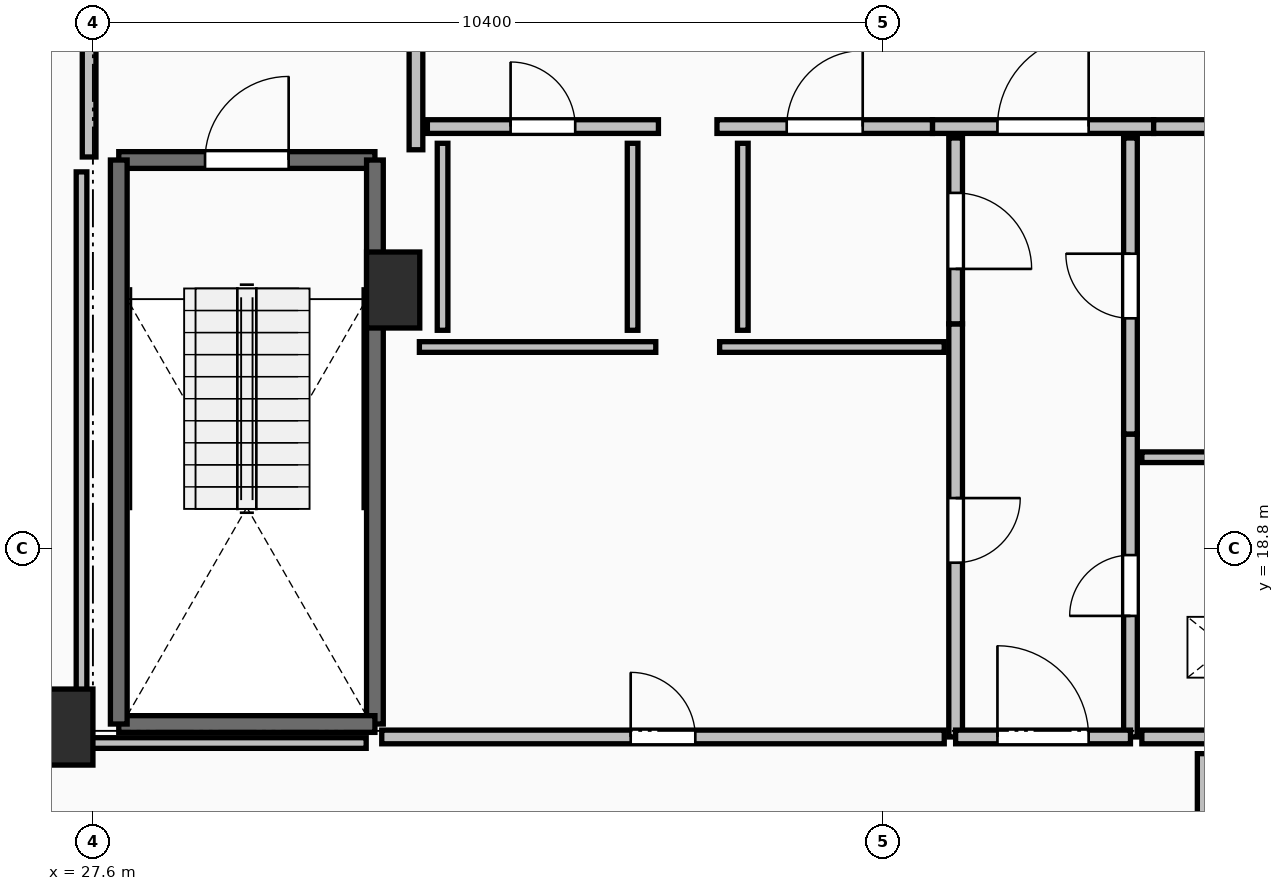
"""IFC4 building model, lengths in metres.
Left out: names, types, materials, properties, quantities, classifications, styles, units other than length and angle.
Written with IfcOpenShell. Run it as: python <this file> out.ifc"""

import sys

from ifc_helpers import new_model, si_unit, direction, frame, frame_2d, origin, origin_2d, place, context, subcontext, project, spatial, rectangle, extrude, element, fill, save


model = new_model("IFC4")
c1 = context("Model", 3, precision=1e-05, world=origin(), true_north=direction((0.0, 1.0)))
c2 = subcontext(c1, "Body", "Model", "MODEL_VIEW")
j1 = project(units=[si_unit("LENGTHUNIT", "METRE"), si_unit("PLANEANGLEUNIT", "RADIAN")], contexts=[c1])
p1 = place(None, origin())
s1 = spatial("IfcSite", under=j1, at=p1, CompositionType="ELEMENT")
p2 = place(p1, origin())
s2 = spatial("IfcBuilding", under=s1, at=p2, CompositionType="ELEMENT")
p3 = place(p2, frame((0.0, 0.0, 266.2)))
s3 = spatial("IfcBuildingStorey", under=s2, at=p3, CompositionType="ELEMENT", Elevation=266.2)
for number, where, z_axis, x_axis in (
    (1, (27.25, 16.45, 0.0), (0.0, 0.0, 1.0), (1.0, 0.0, 0.0)),
    (2, (31.55, 22.2, 0.0), (0.0, 0.0, 1.0), (1.0, 0.0, 0.0)),
):
    element("IfcColumn", number, at=place(p3, frame(where, z_axis=z_axis, x_axis=x_axis)), inside=s3, PredefinedType="PILASTER", context=c2, shape_type="SweptSolid", body=[
        extrude(rectangle(XDim=0.7, YDim=1.0, at=origin_2d()), origin(), (0.0, 0.0, 1.0), 3.55),
    ])
p4 = place(p3, frame((27.94, 23.91, 0.0), z_axis=(0.0, 0.0, 1.0), x_axis=(1.0, 0.0, 0.0)))
e3 = element("IfcWall", 3, at=p4, inside=s3, PredefinedType="SOLIDWALL", context=c2, shape_type="SweptSolid", body=[
    extrude(rectangle(XDim=3.37, YDim=0.22, at=frame_2d((1.685, 0.0))), origin(), (0.0, 0.0, 1.0), 3.29),
])
p5 = place(p4, frame((1.135, 0.0, 0.0)))
e4 = element("IfcOpeningElement", 4, at=p5, cuts=e3, PredefinedType="OPENING", context=c2, shape_type="SweptSolid", body=[
    extrude(rectangle(XDim=1.1, YDim=2.15, at=frame_2d((0.55, 1.075))), frame((0.0, 0.125, 0.0), z_axis=(0.0, -1.0, 0.0), x_axis=(1.0, 0.0, 0.0)), (0.0, 0.0, 1.0), 0.25),
])
p6 = place(p3, frame((31.31, 23.91, 0.0), z_axis=(0.0, 0.0, 1.0), x_axis=(0.0, -1.0, 0.0)))
e5 = element("IfcWall", 5, at=p6, inside=s3, PredefinedType="SOLIDWALL", context=c2, shape_type="SweptSolid", body=[
    extrude(rectangle(XDim=7.42, YDim=0.22, at=frame_2d((3.71, 0.0))), origin(), (0.0, 0.0, 1.0), 3.29),
])
p7 = place(p3, frame((31.31, 16.49, 0.0), z_axis=(0.0, 0.0, 1.0), x_axis=(-1.0, 0.0, 0.0)))
e6 = element("IfcWall", 6, at=p7, inside=s3, PredefinedType="SOLIDWALL", context=c2, shape_type="SweptSolid", body=[
    extrude(rectangle(XDim=3.37, YDim=0.22, at=frame_2d((1.685, 0.0))), origin(), (0.0, 0.0, 1.0), 3.29),
])
p8 = place(p3, frame((27.94, 16.49, 0.0), z_axis=(0.0, 0.0, 1.0), x_axis=(0.0, 1.0, 0.0)))
e7 = element("IfcWall", 7, at=p8, inside=s3, PredefinedType="SOLIDWALL", context=c2, shape_type="SweptSolid", body=[
    extrude(rectangle(XDim=7.42, YDim=0.22, at=frame_2d((3.71, 0.0))), origin(), (0.0, 0.0, 1.0), 3.29),
])
p9 = place(p3, frame((31.85, 24.045, 0.0), z_axis=(0.0, 0.0, 1.0), x_axis=(0.0, 1.0, 0.0)))
e8 = element("IfcWall", 8, at=p9, inside=s3, PredefinedType="PARTITIONING", context=c2, shape_type="SweptSolid", body=[
    extrude(rectangle(XDim=3.91, YDim=0.18, at=frame_2d((1.955, 0.0))), origin(), (0.0, 0.0, 1.0), 3.29),
])
p10 = place(p9, frame((1.355, 0.0, 0.0)))
e9 = element("IfcOpeningElement", 9, at=p10, cuts=e8, PredefinedType="OPENING", context=c2, shape_type="SweptSolid", body=[
    extrude(rectangle(XDim=1.2, YDim=2.15, at=frame_2d((0.6, 1.075))), frame((0.0, 0.105, 0.0), z_axis=(0.0, -1.0, 0.0), x_axis=(1.0, 0.0, 0.0)), (0.0, 0.0, 1.0), 0.21),
])
p11 = place(p3, frame((27.55, 28.0, 0.0), z_axis=(0.0, 0.0, 1.0), x_axis=(0.0, -1.0, 0.0)))
e10 = element("IfcWall", 10, at=p11, inside=s3, PredefinedType="PARTITIONING", context=c2, shape_type="SweptSolid", body=[
    extrude(rectangle(XDim=4.05, YDim=0.18, at=frame_2d((2.025, 0.0))), origin(), (0.0, 0.0, 1.0), 3.29),
])
p12 = place(p11, frame((1.425, 0.0, 0.0)))
e11 = element("IfcOpeningElement", 11, at=p12, cuts=e10, PredefinedType="OPENING", context=c2, shape_type="SweptSolid", body=[
    extrude(rectangle(XDim=1.2, YDim=2.15, at=frame_2d((0.6, 1.075))), frame((0.0, 0.105, 0.0), z_axis=(0.0, -1.0, 0.0), x_axis=(1.0, 0.0, 0.0)), (0.0, 0.0, 1.0), 0.21),
])
p13 = place(p3, frame((38.645, 24.35, 0.0), z_axis=(0.0, 0.0, 1.0), x_axis=(1.0, 0.0, 0.0)))
e12 = element("IfcWall", 12, at=p13, inside=s3, PredefinedType="PARTITIONING", context=c2, shape_type="SweptSolid", body=[
    extrude(rectangle(XDim=2.91, YDim=0.18, at=frame_2d((1.455, 0.0))), origin(), (0.0, 0.0, 1.0), 3.29),
])
p14 = place(p13, frame((0.855, 0.0, 0.0)))
e13 = element("IfcOpeningElement", 13, at=p14, cuts=e12, PredefinedType="OPENING", context=c2, shape_type="SweptSolid", body=[
    extrude(rectangle(XDim=1.2, YDim=2.15, at=frame_2d((0.6, 1.075))), frame((0.0, 0.105, 0.0), z_axis=(0.0, -1.0, 0.0), x_axis=(1.0, 0.0, 0.0)), (0.0, 0.0, 1.0), 0.21),
])
p15 = place(p3, frame((41.555, 24.35, 0.0), z_axis=(0.0, 0.0, 1.0), x_axis=(1.0, 0.0, 0.0)))
e14 = element("IfcWall", 14, at=p15, inside=s3, PredefinedType="PARTITIONING", context=c2, shape_type="SweptSolid", body=[
    extrude(rectangle(XDim=2.445, YDim=0.18, at=frame_2d((1.223, 0.0))), origin(), (0.0, 0.0, 1.0), 3.29),
])
p16 = place(p15, frame((0.798, 0.0, 0.0)))
e15 = element("IfcOpeningElement", 15, at=p16, cuts=e14, PredefinedType="OPENING", context=c2, shape_type="SweptSolid", body=[
    extrude(rectangle(XDim=0.85, YDim=2.1, at=frame_2d((0.425, 1.05))), frame((0.0, 0.105, 0.0), z_axis=(0.0, -1.0, 0.0), x_axis=(1.0, 0.0, 0.0)), (0.0, 0.0, 1.0), 0.21),
])
p17 = place(p3, frame((32.0, 24.35, 0.0), z_axis=(0.0, 0.0, 1.0), x_axis=(1.0, 0.0, 0.0)))
e16 = element("IfcWall", 16, at=p17, inside=s3, PredefinedType="PARTITIONING", context=c2, shape_type="SweptSolid", body=[
    extrude(rectangle(XDim=3.04, YDim=0.18, at=frame_2d((1.52, 0.0))), origin(), (0.0, 0.0, 1.0), 3.29),
])
p18 = place(p17, frame((1.095, 0.0, 0.0)))
e17 = element("IfcOpeningElement", 17, at=p18, cuts=e16, PredefinedType="OPENING", context=c2, shape_type="SweptSolid", body=[
    extrude(rectangle(XDim=0.85, YDim=2.1, at=frame_2d((0.425, 1.05))), frame((0.0, 0.105, 0.0), z_axis=(0.0, -1.0, 0.0), x_axis=(1.0, 0.0, 0.0)), (0.0, 0.0, 1.0), 0.21),
])
p19 = place(p3, frame((35.81, 24.35, 0.0), z_axis=(0.0, 0.0, 1.0), x_axis=(1.0, 0.0, 0.0)))
e18 = element("IfcWall", 18, at=p19, inside=s3, PredefinedType="PARTITIONING", context=c2, shape_type="SweptSolid", body=[
    extrude(rectangle(XDim=2.835, YDim=0.18, at=frame_2d((1.417, 0.0))), origin(), (0.0, 0.0, 1.0), 3.29),
])
p20 = place(p19, frame((0.917, 0.0, 0.0)))
e19 = element("IfcOpeningElement", 19, at=p20, cuts=e18, PredefinedType="OPENING", context=c2, shape_type="SweptSolid", body=[
    extrude(rectangle(XDim=1.0, YDim=2.15, at=frame_2d((0.5, 1.075))), frame((0.0, 0.105, 0.0), z_axis=(0.0, -1.0, 0.0), x_axis=(1.0, 0.0, 0.0)), (0.0, 0.0, 1.0), 0.21),
])
p21 = place(p3, frame((41.25, 16.32, 0.0), z_axis=(0.0, 0.0, 1.0), x_axis=(0.0, 1.0, 0.0)))
e20 = element("IfcWall", 20, at=p21, inside=s3, PredefinedType="PARTITIONING", context=c2, shape_type="SweptSolid", body=[
    extrude(rectangle(XDim=3.985, YDim=0.18, at=frame_2d((1.992, 0.0))), origin(), (0.0, 0.0, 1.0), 3.29),
])
p22 = place(p21, frame((1.593, 0.0, 0.0)))
e21 = element("IfcOpeningElement", 21, at=p22, cuts=e20, PredefinedType="OPENING", context=c2, shape_type="SweptSolid", body=[
    extrude(rectangle(XDim=0.8, YDim=2.05, at=frame_2d((0.4, 1.025))), frame((0.0, 0.105, 0.0), z_axis=(0.0, -1.0, 0.0), x_axis=(1.0, 0.0, 0.0)), (0.0, 0.0, 1.0), 0.21),
])
p23 = place(p3, frame((41.25, 20.305, 0.0), z_axis=(0.0, 0.0, 1.0), x_axis=(0.0, 1.0, 0.0)))
e22 = element("IfcWall", 22, at=p23, inside=s3, PredefinedType="PARTITIONING", context=c2, shape_type="SweptSolid", body=[
    extrude(rectangle(XDim=3.895, YDim=0.18, at=frame_2d((1.948, 0.0))), origin(), (0.0, 0.0, 1.0), 2.482),
])
p24 = place(p23, frame((1.522, 0.0, 0.0)))
e23 = element("IfcOpeningElement", 23, at=p24, cuts=e22, PredefinedType="OPENING", context=c2, shape_type="SweptSolid", body=[
    extrude(rectangle(XDim=0.85, YDim=2.1, at=frame_2d((0.425, 1.05))), frame((0.0, 0.105, 0.0), z_axis=(0.0, -1.0, 0.0), x_axis=(1.0, 0.0, 0.0)), (0.0, 0.0, 1.0), 0.21),
])
p25 = place(p3, frame((38.95, 21.755, 0.0), z_axis=(0.0, 0.0, 1.0), x_axis=(0.0, -1.0, 0.0)))
e24 = element("IfcWall", 24, at=p25, inside=s3, PredefinedType="PARTITIONING", context=c2, shape_type="SweptSolid", body=[
    extrude(rectangle(XDim=5.435, YDim=0.18, at=frame_2d((2.717, 0.0))), origin(), (0.0, 0.0, 1.0), 3.29),
])
p26 = place(p25, frame((2.292, 0.0, 0.0)))
e25 = element("IfcOpeningElement", 25, at=p26, cuts=e24, PredefinedType="OPENING", context=c2, shape_type="SweptSolid", body=[
    extrude(rectangle(XDim=0.85, YDim=2.1, at=frame_2d((0.425, 1.05))), frame((0.0, 0.105, 0.0), z_axis=(0.0, -1.0, 0.0), x_axis=(1.0, 0.0, 0.0)), (0.0, 0.0, 1.0), 0.21),
])
p27 = place(p3, frame((38.95, 24.2, 0.0), z_axis=(0.0, 0.0, 1.0), x_axis=(0.0, -1.0, 0.0)))
e26 = element("IfcWall", 26, at=p27, inside=s3, PredefinedType="PARTITIONING", context=c2, shape_type="SweptSolid", body=[
    extrude(rectangle(XDim=2.445, YDim=0.18, at=frame_2d((1.223, 0.0))), origin(), (0.0, 0.0, 1.0), 2.482),
])
p28 = place(p27, frame((0.722, 0.0, 0.0)))
e27 = element("IfcOpeningElement", 27, at=p28, cuts=e26, PredefinedType="OPENING", context=c2, shape_type="SweptSolid", body=[
    extrude(rectangle(XDim=1.0, YDim=2.15, at=frame_2d((0.5, 1.075))), frame((0.0, 0.105, 0.0), z_axis=(0.0, -1.0, 0.0), x_axis=(1.0, 0.0, 0.0)), (0.0, 0.0, 1.0), 0.21),
])
p29 = place(p3, frame((38.95, 16.32, 0.0), z_axis=(0.0, 0.0, 1.0), x_axis=(1.0, 0.0, 0.0)))
e28 = element("IfcWall", 28, at=p29, inside=s3, PredefinedType="PARTITIONING", context=c2, shape_type="SweptSolid", body=[
    extrude(rectangle(XDim=2.3, YDim=0.18, at=frame_2d((1.15, 0.0))), origin(), (0.0, 0.0, 1.0), 3.29),
])
p30 = place(p29, frame((0.55, 0.0, 0.0)))
e29 = element("IfcOpeningElement", 29, at=p30, cuts=e28, PredefinedType="OPENING", context=c2, shape_type="SweptSolid", body=[
    extrude(rectangle(XDim=1.2, YDim=2.15, at=frame_2d((0.6, 1.075))), frame((0.0, 0.105, 0.0), z_axis=(0.0, -1.0, 0.0), x_axis=(1.0, 0.0, 0.0)), (0.0, 0.0, 1.0), 0.21),
])
p31 = place(p3, frame((44.6, 20.0, 0.0), z_axis=(0.0, 0.0, 1.0), x_axis=(-1.0, 0.0, 0.0)))
e30 = element("IfcWall", 30, at=p31, inside=s3, PredefinedType="PARTITIONING", context=c2, shape_type="SweptSolid", body=[
    extrude(rectangle(XDim=3.2, YDim=0.14, at=frame_2d((1.6, 0.0))), origin(), (0.0, 0.0, 1.0), 3.29),
])
p32 = place(p3, frame((41.4, 16.32, 0.0), z_axis=(0.0, 0.0, 1.0), x_axis=(1.0, 0.0, 0.0)))
e31 = element("IfcWall", 31, at=p32, inside=s3, PredefinedType="PARTITIONING", context=c2, shape_type="SweptSolid", body=[
    extrude(rectangle(XDim=3.2, YDim=0.18, at=frame_2d((1.6, 0.0))), origin(), (0.0, 0.0, 1.0), 3.29),
])
p33 = place(p32, frame((1.2, 0.0, 0.0)))
e32 = element("IfcOpeningElement", 32, at=p33, cuts=e31, PredefinedType="OPENING", context=c2, shape_type="SweptSolid", body=[
    extrude(rectangle(XDim=0.8, YDim=2.05, at=frame_2d((0.4, 1.025))), frame((0.0, 0.105, 0.0), z_axis=(0.0, -1.0, 0.0), x_axis=(1.0, 0.0, 0.0)), (0.0, 0.0, 1.0), 0.21),
])
p34 = place(p3, frame((35.005, 21.45, 0.0), z_axis=(0.0, 0.0, 1.0), x_axis=(-1.0, 0.0, 0.0)))
e33 = element("IfcWall", 33, at=p34, inside=s3, PredefinedType="PARTITIONING", context=c2, shape_type="SweptSolid", body=[
    extrude(rectangle(XDim=3.11, YDim=0.14, at=frame_2d((1.555, 0.0))), origin(), (0.0, 0.0, 1.0), 3.29),
])
p35 = place(p3, frame((38.8, 21.45, 0.0), z_axis=(0.0, 0.0, 1.0), x_axis=(-1.0, 0.0, 0.0)))
e34 = element("IfcWall", 34, at=p35, inside=s3, PredefinedType="PARTITIONING", context=c2, shape_type="SweptSolid", body=[
    extrude(rectangle(XDim=2.955, YDim=0.14, at=frame_2d((1.478, 0.0))), origin(), (0.0, 0.0, 1.0), 3.29),
])
p36 = place(p3, frame((31.4, 16.32, 0.0), z_axis=(0.0, 0.0, 1.0), x_axis=(1.0, 0.0, 0.0)))
e35 = element("IfcWall", 35, at=p36, inside=s3, PredefinedType="PARTITIONING", context=c2, shape_type="SweptSolid", body=[
    extrude(rectangle(XDim=7.4, YDim=0.18, at=frame_2d((3.7, 0.0))), origin(), (0.0, 0.0, 1.0), 3.29),
])
p37 = place(p36, frame((3.275, 0.0, 0.0)))
e36 = element("IfcOpeningElement", 36, at=p37, cuts=e35, PredefinedType="OPENING", context=c2, shape_type="SweptSolid", body=[
    extrude(rectangle(XDim=0.85, YDim=2.1, at=frame_2d((0.425, 1.05))), frame((0.0, 0.105, 0.0), z_axis=(0.0, -1.0, 0.0), x_axis=(1.0, 0.0, 0.0)), (0.0, 0.0, 1.0), 0.21),
])
for number, where, z_axis, x_axis in (
    (37, (32.2, 24.13, 0.0), (0.0, 0.0, 1.0), (0.0, -1.0, 0.0)),
    (38, (34.7, 21.67, 0.0), (0.0, 0.0, 1.0), (0.0, 1.0, 0.0)),
    (39, (36.15, 24.13, 0.0), (0.0, 0.0, 1.0), (0.0, -1.0, 0.0)),
):
    element("IfcWall", number, at=place(p3, frame(where, z_axis=z_axis, x_axis=x_axis)), inside=s3, PredefinedType="PARTITIONING", context=c2, shape_type="SweptSolid", body=[
        extrude(rectangle(XDim=2.46, YDim=0.14, at=frame_2d((1.23, 0.0))), origin(), (0.0, 0.0, 1.0), 2.482),
    ])
p38 = place(p3, frame((27.45, 23.754, 0.0), z_axis=(0.0, 0.0, 1.0), x_axis=(0.0, -1.0, 0.0)))
e40 = element("IfcWall", 40, at=p38, inside=s3, PredefinedType="PARTITIONING", context=c2, shape_type="SweptSolid", body=[
    extrude(rectangle(XDim=7.514, YDim=0.14, at=frame_2d((3.757, 0.0))), origin(), (0.0, 0.0, 1.0), 2.482),
])
p39 = place(p3, frame((27.45, 16.24, 0.0), z_axis=(0.0, 0.0, 1.0), x_axis=(1.0, 0.0, 0.0)))
e41 = element("IfcWall", 41, at=p39, inside=s3, PredefinedType="PARTITIONING", context=c2, shape_type="SweptSolid", body=[
    extrude(rectangle(XDim=3.745, YDim=0.14, at=frame_2d((1.873, 0.0))), origin(), (0.0, 0.0, 1.0), 2.482),
])
p40 = place(p3, frame((42.2, 16.1, 0.0), z_axis=(0.0, 0.0, 1.0), x_axis=(0.0, -1.0, 0.0)))
e42 = element("IfcWall", 42, at=p40, inside=s3, PredefinedType="PARTITIONING", context=c2, shape_type="SweptSolid", body=[
    extrude(rectangle(XDim=1.83, YDim=0.14, at=frame_2d((0.915, 0.0))), origin(), (0.0, 0.0, 1.0), 3.29),
])
p41 = place(p5, origin())
e43 = element("IfcDoor", 43, at=p41, inside=s3, OperationType="SINGLE_SWING_RIGHT", PredefinedType="DOOR", context=c2, shape_type="SweptSolid", body=[
    extrude(rectangle(XDim=1.1, YDim=2.15, at=frame_2d((0.55, 1.075))), frame((0.0, 0.025, 0.0), z_axis=(0.0, -1.0, 0.0), x_axis=(1.0, 0.0, 0.0)), (0.0, 0.0, 1.0), 0.05),
])
fill(e4, e43)
p42 = place(p14, origin())
e44 = element("IfcDoor", 44, at=p42, inside=s3, OperationType="SINGLE_SWING_RIGHT", PredefinedType="DOOR", context=c2, shape_type="SweptSolid", body=[
    extrude(rectangle(XDim=1.2, YDim=2.15, at=frame_2d((0.6, 1.075))), frame((0.0, 0.025, 0.0), z_axis=(0.0, -1.0, 0.0), x_axis=(1.0, 0.0, 0.0)), (0.0, 0.0, 1.0), 0.05),
])
fill(e13, e44)
p43 = place(p18, origin())
e45 = element("IfcDoor", 45, at=p43, inside=s3, OperationType="SINGLE_SWING_LEFT", PredefinedType="DOOR", context=c2, shape_type="SweptSolid", body=[
    extrude(rectangle(XDim=0.85, YDim=2.1, at=frame_2d((0.425, 1.05))), frame((0.0, 0.025, 0.0), z_axis=(0.0, -1.0, 0.0), x_axis=(1.0, 0.0, 0.0)), (0.0, 0.0, 1.0), 0.05),
])
fill(e17, e45)
p44 = place(p20, origin())
e46 = element("IfcDoor", 46, at=p44, inside=s3, OperationType="SINGLE_SWING_RIGHT", PredefinedType="DOOR", context=c2, shape_type="SweptSolid", body=[
    extrude(rectangle(XDim=1.0, YDim=2.15, at=frame_2d((0.5, 1.075))), frame((0.0, 0.025, 0.0), z_axis=(0.0, -1.0, 0.0), x_axis=(1.0, 0.0, 0.0)), (0.0, 0.0, 1.0), 0.05),
])
fill(e19, e46)
p45 = place(p22, origin())
e47 = element("IfcDoor", 47, at=p45, inside=s3, OperationType="SINGLE_SWING_LEFT", PredefinedType="DOOR", context=c2, shape_type="SweptSolid", body=[
    extrude(rectangle(XDim=0.8, YDim=2.05, at=frame_2d((0.4, 1.025))), frame((0.0, 0.025, 0.0), z_axis=(0.0, -1.0, 0.0), x_axis=(1.0, 0.0, 0.0)), (0.0, 0.0, 1.0), 0.05),
])
fill(e21, e47)
p46 = place(p24, origin())
e48 = element("IfcDoor", 48, at=p46, inside=s3, OperationType="SINGLE_SWING_RIGHT", PredefinedType="DOOR", context=c2, shape_type="SweptSolid", body=[
    extrude(rectangle(XDim=0.85, YDim=2.1, at=frame_2d((0.425, 1.05))), frame((0.0, 0.025, 0.0), z_axis=(0.0, -1.0, 0.0), x_axis=(1.0, 0.0, 0.0)), (0.0, 0.0, 1.0), 0.05),
])
fill(e23, e48)
p47 = place(p26, origin())
e49 = element("IfcDoor", 49, at=p47, inside=s3, OperationType="SINGLE_SWING_LEFT", PredefinedType="DOOR", context=c2, shape_type="SweptSolid", body=[
    extrude(rectangle(XDim=0.85, YDim=2.1, at=frame_2d((0.425, 1.05))), frame((0.0, 0.025, 0.0), z_axis=(0.0, -1.0, 0.0), x_axis=(1.0, 0.0, 0.0)), (0.0, 0.0, 1.0), 0.05),
])
fill(e25, e49)
p48 = place(p28, origin())
e50 = element("IfcDoor", 50, at=p48, inside=s3, OperationType="SINGLE_SWING_RIGHT", PredefinedType="DOOR", context=c2, shape_type="SweptSolid", body=[
    extrude(rectangle(XDim=1.0, YDim=2.15, at=frame_2d((0.5, 1.075))), frame((0.0, 0.025, 0.0), z_axis=(0.0, -1.0, 0.0), x_axis=(1.0, 0.0, 0.0)), (0.0, 0.0, 1.0), 0.05),
])
fill(e27, e50)
p49 = place(p30, origin())
e51 = element("IfcDoor", 51, at=p49, inside=s3, OperationType="SINGLE_SWING_LEFT", PredefinedType="DOOR", context=c2, shape_type="SweptSolid", body=[
    extrude(rectangle(XDim=1.2, YDim=2.15, at=frame_2d((0.6, 1.075))), frame((0.0, 0.025, 0.0), z_axis=(0.0, -1.0, 0.0), x_axis=(1.0, 0.0, 0.0)), (0.0, 0.0, 1.0), 0.05),
])
fill(e29, e51)
p50 = place(p37, origin())
e52 = element("IfcDoor", 52, at=p50, inside=s3, OperationType="SINGLE_SWING_LEFT", PredefinedType="DOOR", context=c2, shape_type="SweptSolid", body=[
    extrude(rectangle(XDim=0.85, YDim=2.1, at=frame_2d((0.425, 1.05))), frame((0.0, 0.025, 0.0), z_axis=(0.0, -1.0, 0.0), x_axis=(1.0, 0.0, 0.0)), (0.0, 0.0, 1.0), 0.05),
])
fill(e36, e52)
save(model, sys.argv[1])
